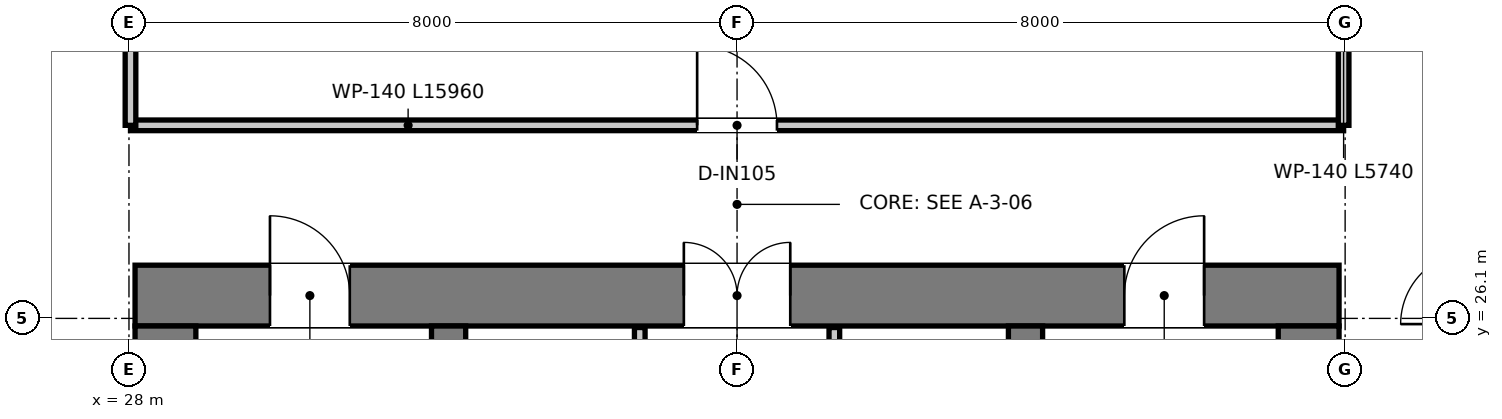
"""IFC4 building model, lengths in metres.
Left out: names, types, materials, properties, quantities, classifications, styles, units other than length and angle.
Written with IfcOpenShell. Run it as: python <this file> out.ifc"""

import sys

from ifc_helpers import new_model, si_unit, direction, frame, frame_2d, origin, place, context, subcontext, project, spatial, rectangle, extrude, element, fill, save


model = new_model("IFC4")
c1 = context("Model", 3, precision=1e-05, world=origin(), true_north=direction((0.0, 1.0)))
c2 = subcontext(c1, "Body", "Model", "MODEL_VIEW")
j1 = project(units=[si_unit("LENGTHUNIT", "METRE"), si_unit("PLANEANGLEUNIT", "RADIAN")], contexts=[c1])
p1 = place(None, origin())
s1 = spatial("IfcSite", under=j1, at=p1, CompositionType="ELEMENT")
p2 = place(p1, origin())
s2 = spatial("IfcBuilding", under=s1, at=p2, CompositionType="ELEMENT")
p3 = place(p2, frame((0.0, 0.0, 56.6)))
s3 = spatial("IfcBuildingStorey", under=s2, at=p3, CompositionType="ELEMENT", Elevation=56.6)
p4 = place(p3, frame((28.08, 26.4, 0.0), z_axis=(0.0, 0.0, 1.0), x_axis=(1.0, 0.0, 0.0)))
e1 = element("IfcWall", 1, at=p4, inside=s3, PredefinedType="SHEAR", context=c2, shape_type="SweptSolid", body=[
    extrude(rectangle(XDim=15.84, YDim=0.8, at=frame_2d((7.92, 0.0))), origin(), (0.0, 0.0, 1.0), 3.95),
])
p5 = place(p4, frame((7.22, 0.0, 0.0)))
e2 = element("IfcOpeningElement", 2, at=p5, cuts=e1, PredefinedType="OPENING", context=c2, shape_type="SweptSolid", body=[
    extrude(rectangle(XDim=1.4, YDim=2.2, at=frame_2d((0.7, 1.1))), frame((0.0, 0.41, 0.0), z_axis=(0.0, -1.0, 0.0), x_axis=(1.0, 0.0, 0.0)), (0.0, 0.0, 1.0), 0.82),
])
p6 = place(p4, frame((1.775, 0.0, 0.0)))
e3 = element("IfcOpeningElement", 3, at=p6, cuts=e1, PredefinedType="OPENING", context=c2, shape_type="SweptSolid", body=[
    extrude(rectangle(XDim=1.05, YDim=2.1, at=frame_2d((0.525, 1.05))), frame((0.0, 0.41, 0.0), z_axis=(0.0, -1.0, 0.0), x_axis=(1.0, 0.0, 0.0)), (0.0, 0.0, 1.0), 0.82),
])
p7 = place(p4, frame((13.015, 0.0, 0.0)))
e4 = element("IfcOpeningElement", 4, at=p7, cuts=e1, PredefinedType="OPENING", context=c2, shape_type="SweptSolid", body=[
    extrude(rectangle(XDim=1.05, YDim=2.1, at=frame_2d((0.525, 1.05))), frame((0.0, 0.41, 0.0), z_axis=(0.0, -1.0, 0.0), x_axis=(1.0, 0.0, 0.0)), (0.0, 0.0, 1.0), 0.82),
])
for number, where, z_axis, x_axis in (
    (5, (28.48, 11.3, 0.0), (0.0, 0.0, 1.0), (0.0, 1.0, 0.0)),
    (6, (43.52, 11.3, 0.0), (0.0, 0.0, 1.0), (0.0, 1.0, 0.0)),
):
    element("IfcWall", number, at=place(p3, frame(where, z_axis=z_axis, x_axis=x_axis)), inside=s3, PredefinedType="SHEAR", context=c2, shape_type="SweptSolid", body=[
        extrude(rectangle(XDim=14.7, YDim=0.8, at=frame_2d((7.35, 0.0))), origin(), (0.0, 0.0, 1.0), 3.95),
    ])
p8 = place(p3, frame((32.205, 13.22, 0.0), z_axis=(0.0, 0.0, 1.0), x_axis=(0.0, 1.0, 0.0)))
e7 = element("IfcWall", 7, at=p8, inside=s3, PredefinedType="SHEAR", context=c2, shape_type="SweptSolid", body=[
    extrude(rectangle(XDim=12.78, YDim=0.45, at=frame_2d((6.39, 0.0))), origin(), (0.0, 0.0, 1.0), 3.95),
])
p9 = place(p8, frame((10.58, 0.0, 0.0)))
e8 = element("IfcOpeningElement", 8, at=p9, cuts=e7, PredefinedType="OPENING", context=c2, shape_type="SweptSolid", body=[
    extrude(rectangle(XDim=1.1, YDim=2.15, at=frame_2d((0.55, 1.075))), frame((0.0, 0.235, 0.0), z_axis=(0.0, -1.0, 0.0), x_axis=(1.0, 0.0, 0.0)), (0.0, 0.0, 1.0), 0.47),
])
p10 = place(p3, frame((39.795, 13.22, 0.0), z_axis=(0.0, 0.0, 1.0), x_axis=(0.0, 1.0, 0.0)))
e9 = element("IfcWall", 9, at=p10, inside=s3, PredefinedType="SHEAR", context=c2, shape_type="SweptSolid", body=[
    extrude(rectangle(XDim=12.78, YDim=0.45, at=frame_2d((6.39, 0.0))), origin(), (0.0, 0.0, 1.0), 3.95),
])
p11 = place(p10, frame((10.58, 0.0, 0.0)))
e10 = element("IfcOpeningElement", 10, at=p11, cuts=e9, PredefinedType="OPENING", context=c2, shape_type="SweptSolid", body=[
    extrude(rectangle(XDim=1.1, YDim=2.15, at=frame_2d((0.55, 1.075))), frame((0.0, 0.235, 0.0), z_axis=(0.0, -1.0, 0.0), x_axis=(1.0, 0.0, 0.0)), (0.0, 0.0, 1.0), 0.47),
])
p12 = place(p3, frame((34.72, 20.2, 0.0), z_axis=(0.0, 0.0, 1.0), x_axis=(0.0, 1.0, 0.0)))
e11 = element("IfcWall", 11, at=p12, inside=s3, PredefinedType="PARTITIONING", context=c2, shape_type="SweptSolid", body=[
    extrude(rectangle(XDim=5.78, YDim=0.14, at=frame_2d((2.89, 0.0))), origin(), (0.0, 0.0, 1.0), 2.47),
])
p13 = place(p12, frame((1.05, 0.0, 0.0)))
e12 = element("IfcOpeningElement", 12, at=p13, cuts=e11, PredefinedType="OPENING", context=c2, shape_type="SweptSolid", body=[
    extrude(rectangle(XDim=0.9, YDim=2.1, at=frame_2d((0.45, 1.05))), frame((0.0, 0.08, 0.0), z_axis=(0.0, -1.0, 0.0), x_axis=(1.0, 0.0, 0.0)), (0.0, 0.0, 1.0), 0.16),
])
p14 = place(p3, frame((37.28, 20.2, 0.0), z_axis=(0.0, 0.0, 1.0), x_axis=(0.0, 1.0, 0.0)))
e13 = element("IfcWall", 13, at=p14, inside=s3, PredefinedType="PARTITIONING", context=c2, shape_type="SweptSolid", body=[
    extrude(rectangle(XDim=5.78, YDim=0.14, at=frame_2d((2.89, 0.0))), origin(), (0.0, 0.0, 1.0), 2.47),
])
p15 = place(p14, frame((0.95, 0.0, 0.0)))
e14 = element("IfcOpeningElement", 14, at=p15, cuts=e13, PredefinedType="OPENING", context=c2, shape_type="SweptSolid", body=[
    extrude(rectangle(XDim=1.1, YDim=2.15, at=frame_2d((0.55, 1.075))), frame((0.0, 0.08, 0.0), z_axis=(0.0, -1.0, 0.0), x_axis=(1.0, 0.0, 0.0)), (0.0, 0.0, 1.0), 0.16),
])
p16 = place(p3, frame((28.02, 28.64, 0.0), z_axis=(0.0, 0.0, 1.0), x_axis=(1.0, 0.0, 0.0)))
e15 = element("IfcWall", 15, at=p16, inside=s3, PredefinedType="PARTITIONING", context=c2, shape_type="SweptSolid", body=[
    extrude(rectangle(XDim=15.96, YDim=0.14, at=frame_2d((7.98, 0.0))), origin(), (0.0, 0.0, 1.0), 3.08),
])
p17 = place(p16, frame((7.455, 0.0, 0.0)))
e16 = element("IfcOpeningElement", 16, at=p17, cuts=e15, PredefinedType="OPENING", context=c2, shape_type="SweptSolid", body=[
    extrude(rectangle(XDim=1.05, YDim=2.15, at=frame_2d((0.525, 1.075))), frame((0.0, 0.08, 0.0), z_axis=(0.0, -1.0, 0.0), x_axis=(1.0, 0.0, 0.0)), (0.0, 0.0, 1.0), 0.16),
])
for number, where, z_axis, x_axis in (
    (17, (28.02, 28.64, 0.0), (0.0, 0.0, 1.0), (0.0, 1.0, 0.0)),
    (18, (43.98, 28.64, 0.0), (0.0, 0.0, 1.0), (0.0, 1.0, 0.0)),
):
    element("IfcWall", number, at=place(p3, frame(where, z_axis=z_axis, x_axis=x_axis)), inside=s3, PredefinedType="PARTITIONING", context=c2, shape_type="SweptSolid", body=[
        extrude(rectangle(XDim=5.74, YDim=0.14, at=frame_2d((2.87, 0.0))), origin(), (0.0, 0.0, 1.0), 3.22),
    ])
p18 = place(p5, origin())
e19 = element("IfcDoor", 19, at=p18, inside=s3, OperationType="DOUBLE_DOOR_SINGLE_SWING", PredefinedType="DOOR", context=c2, shape_type="SweptSolid", body=[
    extrude(rectangle(XDim=1.4, YDim=2.2, at=frame_2d((0.7, 1.1))), frame((0.0, 0.025, 0.0), z_axis=(0.0, -1.0, 0.0), x_axis=(1.0, 0.0, 0.0)), (0.0, 0.0, 1.0), 0.05),
])
fill(e2, e19)
p19 = place(p6, origin())
e20 = element("IfcDoor", 20, at=p19, inside=s3, OperationType="SINGLE_SWING_LEFT", PredefinedType="DOOR", context=c2, shape_type="SweptSolid", body=[
    extrude(rectangle(XDim=1.05, YDim=2.1, at=frame_2d((0.525, 1.05))), frame((0.0, 0.025, 0.0), z_axis=(0.0, -1.0, 0.0), x_axis=(1.0, 0.0, 0.0)), (0.0, 0.0, 1.0), 0.05),
])
fill(e3, e20)
p20 = place(p7, origin())
e21 = element("IfcDoor", 21, at=p20, inside=s3, OperationType="SINGLE_SWING_RIGHT", PredefinedType="DOOR", context=c2, shape_type="SweptSolid", body=[
    extrude(rectangle(XDim=1.05, YDim=2.1, at=frame_2d((0.525, 1.05))), frame((0.0, 0.025, 0.0), z_axis=(0.0, -1.0, 0.0), x_axis=(1.0, 0.0, 0.0)), (0.0, 0.0, 1.0), 0.05),
])
fill(e4, e21)
p21 = place(p17, origin())
e22 = element("IfcDoor", 22, at=p21, inside=s3, OperationType="SINGLE_SWING_LEFT", PredefinedType="DOOR", context=c2, shape_type="SweptSolid", body=[
    extrude(rectangle(XDim=1.05, YDim=2.15, at=frame_2d((0.525, 1.075))), frame((0.0, 0.025, 0.0), z_axis=(0.0, -1.0, 0.0), x_axis=(1.0, 0.0, 0.0)), (0.0, 0.0, 1.0), 0.05),
])
fill(e16, e22)
save(model, sys.argv[1])
